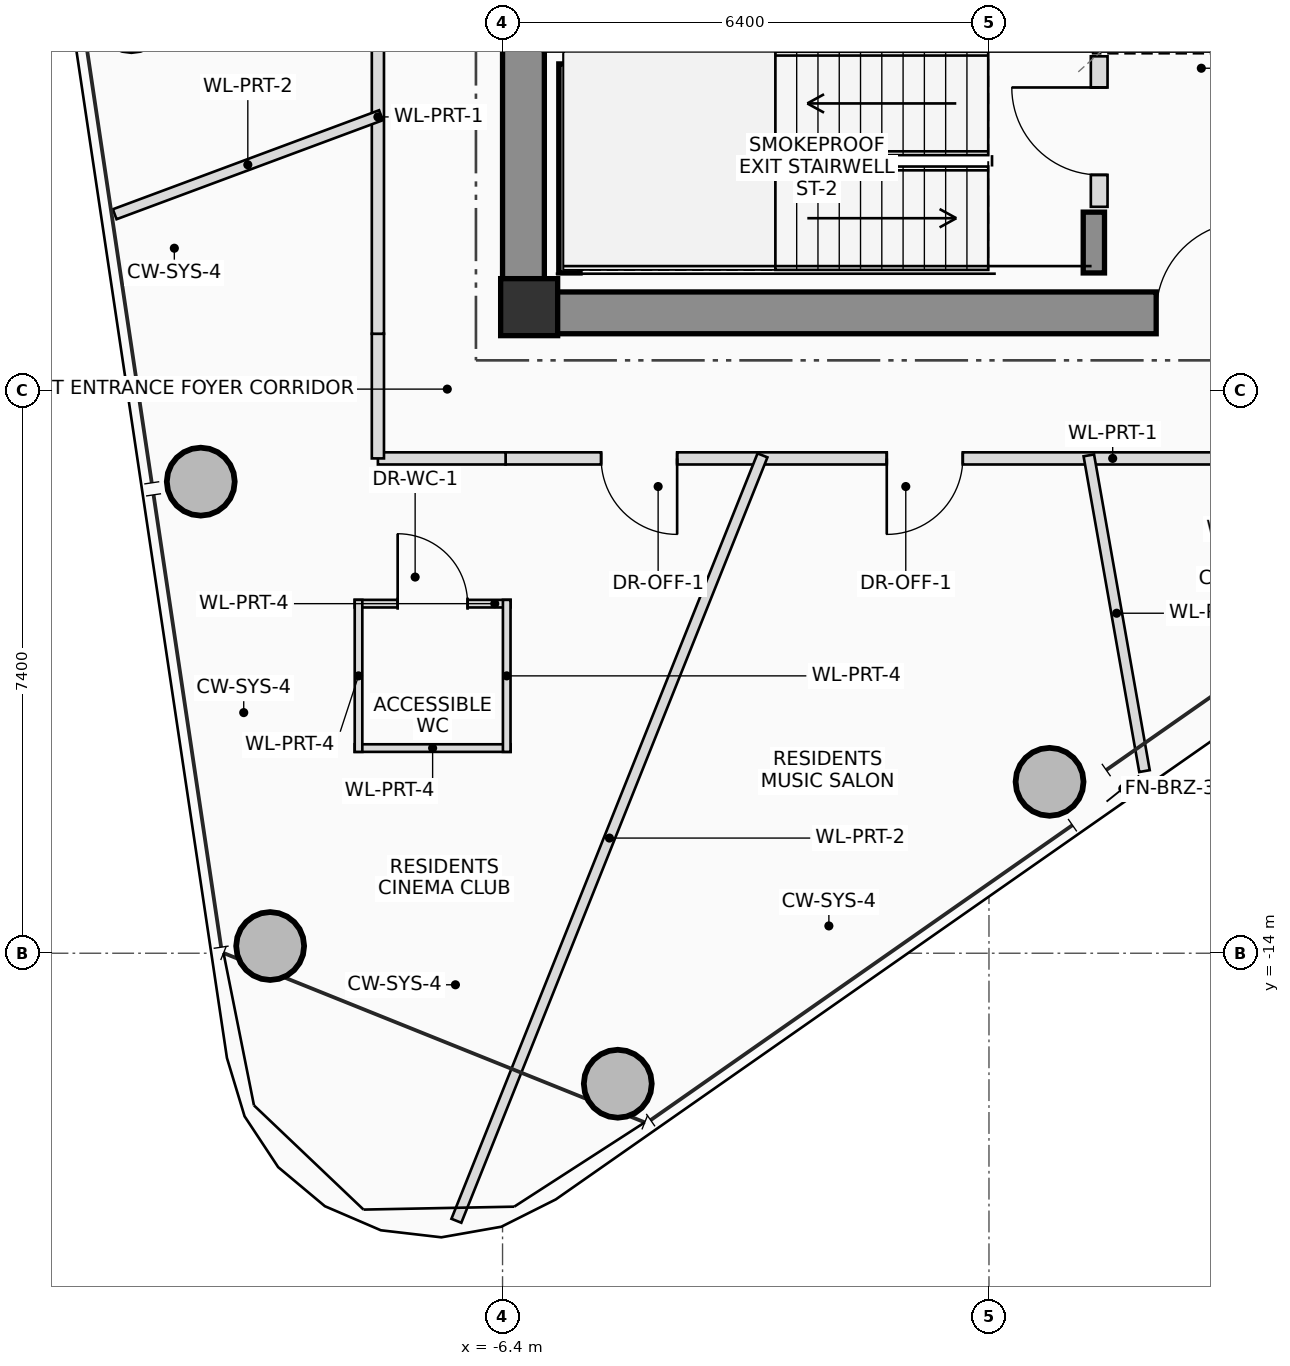
"""IFC4 building model, lengths in metres.
Left out: names, types, materials, properties, quantities, classifications, styles, units other than length and angle.
Written with IfcOpenShell. Run it as: python <this file> out.ifc"""

import sys

from ifc_helpers import new_model, si_unit, direction, frame, frame_2d, origin, origin_2d, place, context, subcontext, project, spatial, rectangle, hollow_circle, extrude, source, transform, mapped, element, fill, save


model = new_model("IFC4")
c1 = context("Model", 3, precision=1e-05, world=origin(), true_north=direction((0.0, 1.0)))
c2 = subcontext(c1, "Body", "Model", "MODEL_VIEW")
j1 = project(units=[si_unit("LENGTHUNIT", "METRE"), si_unit("PLANEANGLEUNIT", "RADIAN")], contexts=[c1])
p1 = place(None, origin())
s1 = spatial("IfcSite", under=j1, at=p1, CompositionType="ELEMENT")
p2 = place(p1, origin())
s2 = spatial("IfcBuilding", under=s1, at=p2, CompositionType="ELEMENT")
p3 = place(p2, frame((0.0, 0.0, 274.55)))
s3 = spatial("IfcBuildingStorey", under=s2, at=p3, CompositionType="ELEMENT", Elevation=274.55)
m1 = source(origin(), c2, "Body", "SweptSolid", [
    extrude(rectangle(XDim=0.75, YDim=0.75, at=origin_2d()), origin(), (0.0, 0.0, 1.0), 3.4),
])
p4 = place(p3, frame((-6.05, -5.5, 0.0), z_axis=(0.0, 0.0, 1.0), x_axis=(1.0, 0.0, 0.0)))
e1 = element("IfcColumn", 1, at=p4, inside=s3, PredefinedType="COLUMN", context=c2, shape_type="MappedRepresentation", body=[
    mapped(m1, transform((0.0, 0.0, 0.0), scale=1.0)),
])
p5 = place(p3, frame((-6.4, -5.575, 0.0), z_axis=(0.0, 0.0, 1.0), x_axis=(1.0, 0.0, 0.0)))
e2 = element("IfcWall", 2, at=p5, inside=s3, PredefinedType="SHEAR", context=c2, shape_type="SweptSolid", body=[
    extrude(rectangle(XDim=12.8, YDim=0.55, at=frame_2d((6.4, 0.0))), origin(), (0.0, 0.0, 1.0), 3.4),
])
p6 = place(p5, frame((8.6, 0.0, 0.0)))
e3 = element("IfcOpeningElement", 3, at=p6, cuts=e2, PredefinedType="OPENING", context=c2, shape_type="SweptSolid", body=[
    extrude(rectangle(XDim=1.2, YDim=2.2, at=frame_2d((0.6, 1.1))), frame((0.0, 0.285, 0.0), z_axis=(0.0, -1.0, 0.0), x_axis=(1.0, 0.0, 0.0)), (0.0, 0.0, 1.0), 0.57),
])
p7 = place(p3, frame((-6.125, -5.3, 0.0), z_axis=(0.0, 0.0, 1.0), x_axis=(0.0, 1.0, 0.0)))
e4 = element("IfcWall", 4, at=p7, inside=s3, PredefinedType="SHEAR", context=c2, shape_type="SweptSolid", body=[
    extrude(rectangle(XDim=3.55, YDim=0.55, at=frame_2d((1.775, 0.0))), origin(), (0.0, 0.0, 1.0), 3.4),
])
p8 = place(p3, frame((-5.52, -5.05, 0.0), z_axis=(0.0, 0.0, 1.0), x_axis=(0.0, 1.0, 0.0)))
e5 = element("IfcWall", 5, at=p8, inside=s3, PredefinedType="SHEAR", context=c2, shape_type="SweptSolid", body=[
    extrude(rectangle(XDim=2.75, YDim=0.28, at=frame_2d((1.375, 0.0))), origin(), (0.0, 0.0, 1.0), 3.4),
])
p9 = place(p3, frame((1.38, -5.05, 0.0), z_axis=(0.0, 0.0, 1.0), x_axis=(0.0, 1.0, 0.0)))
e6 = element("IfcWall", 6, at=p9, inside=s3, PredefinedType="SHEAR", context=c2, shape_type="SweptSolid", body=[
    extrude(rectangle(XDim=0.8, YDim=0.28, at=frame_2d((0.4, 0.0))), origin(), (0.0, 0.0, 1.0), 3.4),
])
m2 = source(origin(), c2, "Body", "SweptSolid", [
    extrude(hollow_circle(Radius=0.45, WallThickness=0.032, at=origin_2d()), origin(), (0.0, 0.0, 1.0), 3.4),
])
for number, where, z_axis, x_axis in (
    (7, (-4.884, -15.717, 0.0), (0.0, 0.0, 1.0), (1.0, 0.0, 0.0)),
    (8, (0.797, -11.745, 0.0), (0.0, 0.0, 1.0), (1.0, 0.0, 0.0)),
    (9, (-10.371, -7.796, 0.0), (0.0, 0.0, 1.0), (1.0, 0.0, 0.0)),
    (10, (-9.458, -13.905, 0.0), (0.0, 0.0, 1.0), (1.0, 0.0, 0.0)),
):
    element("IfcColumn", number, at=place(p3, frame(where, z_axis=z_axis, x_axis=x_axis)), inside=s3, PredefinedType="COLUMN", context=c2, shape_type="MappedRepresentation", body=[
        mapped(m2, transform((0.0, 0.0, 0.0), scale=1.0)),
    ])
p10 = place(p3, frame((1.45, -4.18, 0.0), z_axis=(0.0, 0.0, 1.0), x_axis=(0.0, 1.0, 0.0)))
e11 = element("IfcWall", 11, at=p10, inside=s3, PredefinedType="PLUMBINGWALL", context=c2, shape_type="SweptSolid", body=[
    extrude(rectangle(XDim=1.98, YDim=0.22, at=frame_2d((0.99, 0.0))), origin(), (0.0, 0.0, 1.0), 3.2),
])
p11 = place(p10, frame((0.42, 0.0, 0.0)))
e12 = element("IfcOpeningElement", 12, at=p11, cuts=e11, PredefinedType="OPENING", context=c2, shape_type="SweptSolid", body=[
    extrude(rectangle(XDim=1.15, YDim=2.15, at=frame_2d((0.575, 1.075))), frame((0.0, 0.12, 0.0), z_axis=(0.0, -1.0, 0.0), x_axis=(1.0, 0.0, 0.0)), (0.0, 0.0, 1.0), 0.24),
])
p12 = place(p3, frame((-8.345, -9.401, 0.0), z_axis=(0.0, 0.0, 1.0), x_axis=(1.0, 0.0, 0.0)))
e13 = element("IfcWall", 13, at=p12, inside=s3, PredefinedType="PARTITIONING", context=c2, shape_type="SweptSolid", body=[
    extrude(rectangle(XDim=2.05, YDim=0.1, at=frame_2d((1.025, 0.0))), origin(), (0.0, 0.0, 1.0), 2.605),
])
p13 = place(p12, frame((0.565, 0.0, 0.0)))
e14 = element("IfcOpeningElement", 14, at=p13, cuts=e13, PredefinedType="OPENING", context=c2, shape_type="SweptSolid", body=[
    extrude(rectangle(XDim=0.92, YDim=2.1, at=frame_2d((0.46, 1.05))), frame((0.0, 0.06, 0.0), z_axis=(0.0, -1.0, 0.0), x_axis=(1.0, 0.0, 0.0)), (0.0, 0.0, 1.0), 0.12),
])
p14 = place(p3, frame((-6.295, -11.301, 0.0), z_axis=(0.0, 0.0, 1.0), x_axis=(-1.0, 0.0, 0.0)))
e15 = element("IfcWall", 15, at=p14, inside=s3, PredefinedType="PARTITIONING", context=c2, shape_type="SweptSolid", body=[
    extrude(rectangle(XDim=2.05, YDim=0.1, at=frame_2d((1.025, 0.0))), origin(), (0.0, 0.0, 1.0), 3.2),
])
p15 = place(p3, frame((-6.345, -9.351, 0.0), z_axis=(0.0, 0.0, 1.0), x_axis=(0.0, -1.0, 0.0)))
e16 = element("IfcWall", 16, at=p15, inside=s3, PredefinedType="PARTITIONING", context=c2, shape_type="SweptSolid", body=[
    extrude(rectangle(XDim=2.0, YDim=0.1, at=frame_2d((1.0, 0.0))), origin(), (0.0, 0.0, 1.0), 2.805),
])
p16 = place(p3, frame((-8.295, -11.351, 0.0), z_axis=(0.0, 0.0, 1.0), x_axis=(0.0, 1.0, 0.0)))
e17 = element("IfcWall", 17, at=p16, inside=s3, PredefinedType="PARTITIONING", context=c2, shape_type="SweptSolid", body=[
    extrude(rectangle(XDim=2.0, YDim=0.1, at=frame_2d((1.0, 0.0))), origin(), (0.0, 0.0, 1.0), 2.605),
])
p17 = place(p3, frame((3.45, -7.49, 0.0), z_axis=(0.0, 0.0, 1.0), x_axis=(-1.0, 0.0, 0.0)))
e18 = element("IfcWall", 18, at=p17, inside=s3, PredefinedType="PARTITIONING", context=c2, shape_type="SweptSolid", body=[
    extrude(rectangle(XDim=9.81, YDim=0.16, at=frame_2d((4.905, 0.0))), origin(), (0.0, 0.0, 1.0), 2.605),
])
p18 = place(p17, frame((3.795, 0.0, 0.0)))
e19 = element("IfcOpeningElement", 19, at=p18, cuts=e18, PredefinedType="OPENING", context=c2, shape_type="SweptSolid", body=[
    extrude(rectangle(XDim=1.0, YDim=2.25, at=frame_2d((0.5, 1.125))), frame((0.0, 0.09, 0.0), z_axis=(0.0, -1.0, 0.0), x_axis=(1.0, 0.0, 0.0)), (0.0, 0.0, 1.0), 0.18),
])
p19 = place(p17, frame((7.553, 0.0, 0.0)))
e20 = element("IfcOpeningElement", 20, at=p19, cuts=e18, PredefinedType="OPENING", context=c2, shape_type="SweptSolid", body=[
    extrude(rectangle(XDim=1.0, YDim=2.25, at=frame_2d((0.5, 1.125))), frame((0.0, 0.09, 0.0), z_axis=(0.0, -1.0, 0.0), x_axis=(1.0, 0.0, 0.0)), (0.0, 0.0, 1.0), 0.18),
])
p20 = place(p3, frame((-6.36, -7.49, 0.0), z_axis=(0.0, 0.0, 1.0), x_axis=(-1.0, 0.0, 0.0)))
e21 = element("IfcWall", 21, at=p20, inside=s3, PredefinedType="PARTITIONING", context=c2, shape_type="SweptSolid", body=[
    extrude(rectangle(XDim=1.68, YDim=0.16, at=frame_2d((0.84, 0.0))), origin(), (0.0, 0.0, 1.0), 2.605),
])
p21 = place(p3, frame((-8.04, -7.49, 0.0), z_axis=(0.0, 0.0, 1.0), x_axis=(0.0, 1.0, 0.0)))
e22 = element("IfcWall", 22, at=p21, inside=s3, PredefinedType="PARTITIONING", context=c2, shape_type="SweptSolid", body=[
    extrude(rectangle(XDim=1.64, YDim=0.16, at=frame_2d((0.82, 0.0))), origin(), (0.0, 0.0, 1.0), 2.605),
])
p22 = place(p3, frame((-8.04, -5.85, 0.0), z_axis=(0.0, 0.0, 1.0), x_axis=(0.0, 1.0, 0.0)))
e23 = element("IfcWall", 23, at=p22, inside=s3, PredefinedType="PARTITIONING", context=c2, shape_type="SweptSolid", body=[
    extrude(rectangle(XDim=11.7, YDim=0.16, at=frame_2d((5.85, 0.0))), origin(), (0.0, 0.0, 1.0), 2.605),
])
p23 = place(p22, frame((5.855, 0.0, 0.0)))
e24 = element("IfcOpeningElement", 24, at=p23, cuts=e23, PredefinedType="OPENING", context=c2, shape_type="SweptSolid", body=[
    extrude(rectangle(XDim=1.0, YDim=2.25, at=frame_2d((0.5, 1.125))), frame((0.0, 0.09, 0.0), z_axis=(0.0, -1.0, 0.0), x_axis=(1.0, 0.0, 0.0)), (0.0, 0.0, 1.0), 0.18),
])
p24 = place(p3, frame((-8.0, -2.975, 0.0), z_axis=(0.0, 0.0, 1.0), x_axis=(-0.937281421119, -0.348573575627, 0.0)))
e25 = element("IfcWall", 25, at=p24, inside=s3, PredefinedType="PARTITIONING", context=c2, shape_type="SweptSolid", body=[
    extrude(rectangle(XDim=3.737, YDim=0.14, at=frame_2d((1.869, 0.0))), origin(), (0.0, 0.0, 1.0), 2.605),
])
p25 = place(p3, frame((-2.98, -7.45, 0.0), z_axis=(0.0, 0.0, 1.0), x_axis=(-0.37136350778, -0.928487557854, 0.0)))
e26 = element("IfcWall", 26, at=p25, inside=s3, PredefinedType="PARTITIONING", context=c2, shape_type="SweptSolid", body=[
    extrude(rectangle(XDim=10.845, YDim=0.14, at=frame_2d((5.423, 0.0))), origin(), (0.0, 0.0, 1.0), 2.605),
])
p26 = place(p3, frame((1.314, -7.45, 0.0), z_axis=(0.0, 0.0, 1.0), x_axis=(0.17364664795, -0.984808022741, 0.0)))
e27 = element("IfcWall", 27, at=p26, inside=s3, PredefinedType="PARTITIONING", context=c2, shape_type="SweptSolid", body=[
    extrude(rectangle(XDim=4.218, YDim=0.14, at=frame_2d((2.109, 0.0))), origin(), (0.0, 0.0, 1.0), 2.605),
])
p27 = place(p6, origin())
e28 = element("IfcDoor", 28, at=p27, inside=s3, OperationType="SINGLE_SWING_RIGHT", PredefinedType="DOOR", context=c2, shape_type="SweptSolid", body=[
    extrude(rectangle(XDim=1.2, YDim=2.2, at=frame_2d((0.6, 1.1))), frame((0.0, 0.025, 0.0), z_axis=(0.0, -1.0, 0.0), x_axis=(1.0, 0.0, 0.0)), (0.0, 0.0, 1.0), 0.05),
])
fill(e3, e28)
p28 = place(p11, origin())
e29 = element("IfcDoor", 29, at=p28, inside=s3, OperationType="SINGLE_SWING_RIGHT", PredefinedType="DOOR", context=c2, shape_type="SweptSolid", body=[
    extrude(rectangle(XDim=1.15, YDim=2.15, at=frame_2d((0.575, 1.075))), frame((0.0, 0.025, 0.0), z_axis=(0.0, -1.0, 0.0), x_axis=(1.0, 0.0, 0.0)), (0.0, 0.0, 1.0), 0.05),
])
fill(e12, e29)
p29 = place(p13, origin())
e30 = element("IfcDoor", 30, at=p29, inside=s3, OperationType="SINGLE_SWING_LEFT", PredefinedType="DOOR", context=c2, shape_type="SweptSolid", body=[
    extrude(rectangle(XDim=0.92, YDim=2.1, at=frame_2d((0.46, 1.05))), frame((0.0, 0.025, 0.0), z_axis=(0.0, -1.0, 0.0), x_axis=(1.0, 0.0, 0.0)), (0.0, 0.0, 1.0), 0.05),
])
fill(e14, e30)
p30 = place(p18, origin())
e31 = element("IfcDoor", 31, at=p30, inside=s3, OperationType="SINGLE_SWING_RIGHT", PredefinedType="DOOR", context=c2, shape_type="SweptSolid", body=[
    extrude(rectangle(XDim=1.0, YDim=2.25, at=frame_2d((0.5, 1.125))), frame((0.0, 0.025, 0.0), z_axis=(0.0, -1.0, 0.0), x_axis=(1.0, 0.0, 0.0)), (0.0, 0.0, 1.0), 0.05),
])
fill(e19, e31)
p31 = place(p19, origin())
e32 = element("IfcDoor", 32, at=p31, inside=s3, OperationType="SINGLE_SWING_LEFT", PredefinedType="DOOR", context=c2, shape_type="SweptSolid", body=[
    extrude(rectangle(XDim=1.0, YDim=2.25, at=frame_2d((0.5, 1.125))), frame((0.0, 0.025, 0.0), z_axis=(0.0, -1.0, 0.0), x_axis=(1.0, 0.0, 0.0)), (0.0, 0.0, 1.0), 0.05),
])
fill(e20, e32)
save(model, sys.argv[1])
